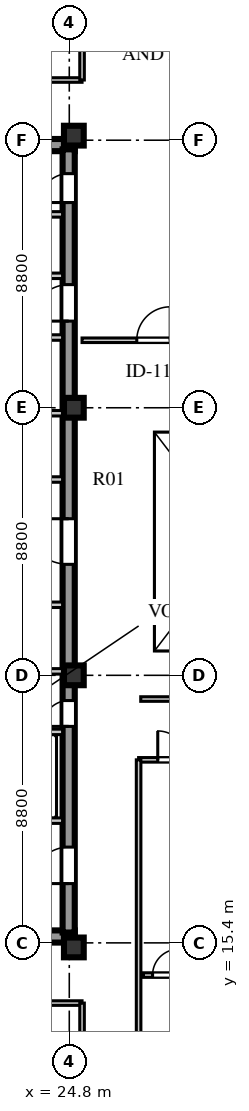
"""IFC4 building model, lengths in metres.
Left out: names, types, materials, properties, quantities, classifications, styles, units other than length and angle.
Written with IfcOpenShell. Run it as: python <this file> out.ifc"""

import sys

from ifc_helpers import new_model, si_unit, direction, frame, frame_2d, origin, origin_2d, place, context, subcontext, project, spatial, rectangle, extrude, element, fill, save


model = new_model("IFC4")
c1 = context("Model", 3, precision=1e-05, world=origin(), true_north=direction((0.0, 1.0)))
c2 = subcontext(c1, "Body", "Model", "MODEL_VIEW")
j1 = project(units=[si_unit("LENGTHUNIT", "METRE"), si_unit("PLANEANGLEUNIT", "RADIAN")], contexts=[c1])
p1 = place(None, origin())
s1 = spatial("IfcSite", under=j1, at=p1, CompositionType="ELEMENT")
p2 = place(p1, origin())
s2 = spatial("IfcBuilding", under=s1, at=p2, CompositionType="ELEMENT")
p3 = place(p2, frame((0.0, 0.0, 237.5)))
s3 = spatial("IfcBuildingStorey", under=s2, at=p3, CompositionType="ELEMENT", Elevation=237.5)
for number, where, z_axis, x_axis in (
    (1, (15.5, 15.61, 0.0), (0.0, 0.0, 1.0), (1.0, 0.0, 0.0)),
    (2, (15.5, 41.64, 0.0), (0.0, 0.0, 1.0), (1.0, 0.0, 0.0)),
):
    element("IfcWall", number, at=place(p3, frame(where, z_axis=z_axis, x_axis=x_axis)), inside=s3, PredefinedType="SHEAR", context=c2, shape_type="SweptSolid", body=[
        extrude(rectangle(XDim=9.48, YDim=0.4, at=frame_2d((4.74, 0.0))), origin(), (0.0, 0.0, 1.0), 3.66),
    ])
p4 = place(p3, frame((24.78, 15.74, 0.0), z_axis=(0.0, 0.0, 1.0), x_axis=(0.0, 1.0, 0.0)))
e3 = element("IfcWall", 3, at=p4, inside=s3, PredefinedType="SHEAR", context=c2, shape_type="SweptSolid", body=[
    extrude(rectangle(XDim=25.76, YDim=0.4, at=frame_2d((12.88, 0.0))), origin(), (0.0, 0.0, 1.0), 3.66),
])
p5 = place(p4, frame((1.61, 0.0, 0.0)))
e4 = element("IfcOpeningElement", 4, at=p5, cuts=e3, PredefinedType="OPENING", context=c2, shape_type="SweptSolid", body=[
    extrude(rectangle(XDim=1.2, YDim=2.1, at=frame_2d((0.6, 1.05))), frame((0.0, 0.21, 0.0), z_axis=(0.0, -1.0, 0.0), x_axis=(1.0, 0.0, 0.0)), (0.0, 0.0, 1.0), 0.42),
])
p6 = place(p4, frame((6.78, 0.0, 0.0)))
e5 = element("IfcOpeningElement", 5, at=p6, cuts=e3, PredefinedType="OPENING", context=c2, shape_type="SweptSolid", body=[
    extrude(rectangle(XDim=0.85, YDim=2.06, at=frame_2d((0.425, 1.03))), frame((0.0, 0.21, 0.0), z_axis=(0.0, -1.0, 0.0), x_axis=(1.0, 0.0, 0.0)), (0.0, 0.0, 1.0), 0.42),
])
p7 = place(p4, frame((12.11, 0.0, 0.0)))
e6 = element("IfcOpeningElement", 6, at=p7, cuts=e3, PredefinedType="OPENING", context=c2, shape_type="SweptSolid", body=[
    extrude(rectangle(XDim=1.5, YDim=2.12, at=frame_2d((0.75, 1.06))), frame((0.0, 0.21, 0.0), z_axis=(0.0, -1.0, 0.0), x_axis=(1.0, 0.0, 0.0)), (0.0, 0.0, 1.0), 0.42),
])
p8 = place(p4, frame((20.11, 0.0, 0.0)))
e7 = element("IfcOpeningElement", 7, at=p8, cuts=e3, PredefinedType="OPENING", context=c2, shape_type="SweptSolid", body=[
    extrude(rectangle(XDim=1.2, YDim=2.12, at=frame_2d((0.6, 1.06))), frame((0.0, 0.21, 0.0), z_axis=(0.0, -1.0, 0.0), x_axis=(1.0, 0.0, 0.0)), (0.0, 0.0, 1.0), 0.42),
])
p9 = place(p4, frame((24.01, 0.0, 0.0)))
e8 = element("IfcOpeningElement", 8, at=p9, cuts=e3, PredefinedType="OPENING", context=c2, shape_type="SweptSolid", body=[
    extrude(rectangle(XDim=0.95, YDim=2.1, at=frame_2d((0.475, 1.05))), frame((0.0, 0.21, 0.0), z_axis=(0.0, -1.0, 0.0), x_axis=(1.0, 0.0, 0.0)), (0.0, 0.0, 1.0), 0.42),
])
for number, where, z_axis, x_axis in (
    (9, (24.95, 15.25, 0.0), (0.0, 0.0, 1.0), (1.0, 0.0, 0.0)),
    (10, (24.95, 24.2, 0.0), (0.0, 0.0, 1.0), (1.0, 0.0, 0.0)),
    (11, (24.95, 33.0, 0.0), (0.0, 0.0, 1.0), (1.0, 0.0, 0.0)),
    (12, (24.95, 41.95, 0.0), (0.0, 0.0, 1.0), (1.0, 0.0, 0.0)),
):
    element("IfcColumn", number, at=place(p3, frame(where, z_axis=z_axis, x_axis=x_axis)), inside=s3, PredefinedType="COLUMN", context=c2, shape_type="SweptSolid", body=[
        extrude(rectangle(XDim=0.65, YDim=0.65, at=origin_2d()), origin(), (0.0, 0.0, 1.0), 3.66),
    ])
p10 = place(p3, frame((19.64, 19.42, 0.0), z_axis=(0.0, 0.0, 1.0), x_axis=(1.0, 0.0, 0.0)))
e13 = element("IfcWall", 13, at=p10, inside=s3, PredefinedType="SOLIDWALL", context=c2, shape_type="SweptSolid", body=[
    extrude(rectangle(XDim=4.94, YDim=0.18, at=frame_2d((2.47, 0.0))), origin(), (0.0, 0.0, 1.0), 3.66),
])
p11 = place(p10, frame((0.72, 0.0, 0.0)))
e14 = element("IfcOpeningElement", 14, at=p11, cuts=e13, PredefinedType="OPENING", context=c2, shape_type="SweptSolid", body=[
    extrude(rectangle(XDim=1.1, YDim=2.1, at=frame_2d((0.55, 1.05))), frame((0.0, 0.1, 0.0), z_axis=(0.0, -1.0, 0.0), x_axis=(1.0, 0.0, 0.0)), (0.0, 0.0, 1.0), 0.2),
])
p12 = place(p10, frame((3.02, 0.0, 0.0)))
e15 = element("IfcOpeningElement", 15, at=p12, cuts=e13, PredefinedType="OPENING", context=c2, shape_type="SweptSolid", body=[
    extrude(rectangle(XDim=1.1, YDim=2.1, at=frame_2d((0.55, 1.05))), frame((0.0, 0.1, 0.0), z_axis=(0.0, -1.0, 0.0), x_axis=(1.0, 0.0, 0.0)), (0.0, 0.0, 1.0), 0.2),
])
p13 = place(p3, frame((19.64, 22.34, 0.0), z_axis=(0.0, 0.0, 1.0), x_axis=(1.0, 0.0, 0.0)))
e16 = element("IfcWall", 16, at=p13, inside=s3, PredefinedType="SOLIDWALL", context=c2, shape_type="SweptSolid", body=[
    extrude(rectangle(XDim=4.94, YDim=0.18, at=frame_2d((2.47, 0.0))), origin(), (0.0, 0.0, 1.0), 3.66),
])
p14 = place(p3, frame((15.9, 26.52, 0.0), z_axis=(0.0, 0.0, 1.0), x_axis=(1.0, 0.0, 0.0)))
e17 = element("IfcWall", 17, at=p14, inside=s3, PredefinedType="SOLIDWALL", context=c2, shape_type="SweptSolid", body=[
    extrude(rectangle(XDim=8.68, YDim=0.18, at=frame_2d((4.34, 0.0))), origin(), (0.0, 0.0, 1.0), 3.66),
])
p15 = place(p14, frame((2.5, 0.0, 0.0)))
e18 = element("IfcOpeningElement", 18, at=p15, cuts=e17, PredefinedType="OPENING", context=c2, shape_type="SweptSolid", body=[
    extrude(rectangle(XDim=0.95, YDim=2.1, at=frame_2d((0.475, 1.05))), frame((0.0, 0.1, 0.0), z_axis=(0.0, -1.0, 0.0), x_axis=(1.0, 0.0, 0.0)), (0.0, 0.0, 1.0), 0.2),
])
p16 = place(p14, frame((6.0, 0.0, 0.0)))
e19 = element("IfcOpeningElement", 19, at=p16, cuts=e17, PredefinedType="OPENING", context=c2, shape_type="SweptSolid", body=[
    extrude(rectangle(XDim=0.95, YDim=2.1, at=frame_2d((0.475, 1.05))), frame((0.0, 0.1, 0.0), z_axis=(0.0, -1.0, 0.0), x_axis=(1.0, 0.0, 0.0)), (0.0, 0.0, 1.0), 0.2),
])
p17 = place(p3, frame((15.9, 24.33, 0.0), z_axis=(0.0, 0.0, 1.0), x_axis=(1.0, 0.0, 0.0)))
e20 = element("IfcWall", 20, at=p17, inside=s3, PredefinedType="SOLIDWALL", context=c2, shape_type="SweptSolid", body=[
    extrude(rectangle(XDim=8.68, YDim=0.18, at=frame_2d((4.34, 0.0))), origin(), (0.0, 0.0, 1.0), 3.06),
])
p18 = place(p3, frame((15.9, 30.64, 0.0), z_axis=(0.0, 0.0, 1.0), x_axis=(1.0, 0.0, 0.0)))
e21 = element("IfcWall", 21, at=p18, inside=s3, PredefinedType="SOLIDWALL", context=c2, shape_type="SweptSolid", body=[
    extrude(rectangle(XDim=8.68, YDim=0.18, at=frame_2d((4.34, 0.0))), origin(), (0.0, 0.0, 1.0), 3.66),
])
p19 = place(p18, frame((3.7, 0.0, 0.0)))
e22 = element("IfcOpeningElement", 22, at=p19, cuts=e21, PredefinedType="OPENING", context=c2, shape_type="SweptSolid", body=[
    extrude(rectangle(XDim=0.95, YDim=2.1, at=frame_2d((0.475, 1.05))), frame((0.0, 0.1, 0.0), z_axis=(0.0, -1.0, 0.0), x_axis=(1.0, 0.0, 0.0)), (0.0, 0.0, 1.0), 0.2),
])
p20 = place(p3, frame((15.9, 32.82, 0.0), z_axis=(0.0, 0.0, 1.0), x_axis=(1.0, 0.0, 0.0)))
e23 = element("IfcWall", 23, at=p20, inside=s3, PredefinedType="SOLIDWALL", context=c2, shape_type="SweptSolid", body=[
    extrude(rectangle(XDim=8.68, YDim=0.18, at=frame_2d((4.34, 0.0))), origin(), (0.0, 0.0, 1.0), 3.06),
])
p21 = place(p3, frame((22.02, 35.31, 0.0), z_axis=(0.0, 0.0, 1.0), x_axis=(1.0, 0.0, 0.0)))
e24 = element("IfcWall", 24, at=p21, inside=s3, PredefinedType="SOLIDWALL", context=c2, shape_type="SweptSolid", body=[
    extrude(rectangle(XDim=2.56, YDim=0.18, at=frame_2d((1.28, 0.0))), origin(), (0.0, 0.0, 1.0), 3.66),
])
p22 = place(p21, frame((0.55, 0.0, 0.0)))
e25 = element("IfcOpeningElement", 25, at=p22, cuts=e24, PredefinedType="OPENING", context=c2, shape_type="SweptSolid", body=[
    extrude(rectangle(XDim=1.0, YDim=2.1, at=frame_2d((0.5, 1.05))), frame((0.0, 0.1, 0.0), z_axis=(0.0, -1.0, 0.0), x_axis=(1.0, 0.0, 0.0)), (0.0, 0.0, 1.0), 0.2),
])
p23 = place(p3, frame((19.64, 37.34, 0.0), z_axis=(0.0, 0.0, 1.0), x_axis=(1.0, 0.0, 0.0)))
e26 = element("IfcWall", 26, at=p23, inside=s3, PredefinedType="SOLIDWALL", context=c2, shape_type="SweptSolid", body=[
    extrude(rectangle(XDim=4.94, YDim=0.18, at=frame_2d((2.47, 0.0))), origin(), (0.0, 0.0, 1.0), 3.66),
])
p24 = place(p23, frame((0.45, 0.0, 0.0)))
e27 = element("IfcOpeningElement", 27, at=p24, cuts=e26, PredefinedType="OPENING", context=c2, shape_type="SweptSolid", body=[
    extrude(rectangle(XDim=1.0, YDim=2.1, at=frame_2d((0.5, 1.05))), frame((0.0, 0.1, 0.0), z_axis=(0.0, -1.0, 0.0), x_axis=(1.0, 0.0, 0.0)), (0.0, 0.0, 1.0), 0.2),
])
p25 = place(p23, frame((2.5, 0.0, 0.0)))
e28 = element("IfcOpeningElement", 28, at=p25, cuts=e26, PredefinedType="OPENING", context=c2, shape_type="SweptSolid", body=[
    extrude(rectangle(XDim=1.0, YDim=2.1, at=frame_2d((0.5, 1.05))), frame((0.0, 0.1, 0.0), z_axis=(0.0, -1.0, 0.0), x_axis=(1.0, 0.0, 0.0)), (0.0, 0.0, 1.0), 0.2),
])
p26 = place(p3, frame((19.64, 39.36, 0.0), z_axis=(0.0, 0.0, 1.0), x_axis=(1.0, 0.0, 0.0)))
e29 = element("IfcWall", 29, at=p26, inside=s3, PredefinedType="SOLIDWALL", context=c2, shape_type="SweptSolid", body=[
    extrude(rectangle(XDim=4.94, YDim=0.18, at=frame_2d((2.47, 0.0))), origin(), (0.0, 0.0, 1.0), 3.66),
])
p27 = place(p3, frame((27.08, 21.42, 0.0), z_axis=(0.0, 0.0, 1.0), x_axis=(1.0, 0.0, 0.0)))
e30 = element("IfcWall", 30, at=p27, inside=s3, PredefinedType="PARTITIONING", context=c2, shape_type="SweptSolid", body=[
    extrude(rectangle(XDim=12.07, YDim=0.15, at=frame_2d((6.035, 0.0))), origin(), (0.0, 0.0, 1.0), 3.31),
])
p28 = place(p27, frame((0.63, 0.0, 0.0)))
e31 = element("IfcOpeningElement", 31, at=p28, cuts=e30, PredefinedType="OPENING", context=c2, shape_type="SweptSolid", body=[
    extrude(rectangle(XDim=0.95, YDim=2.1, at=frame_2d((0.475, 1.05))), frame((0.0, 0.085, 0.0), z_axis=(0.0, -1.0, 0.0), x_axis=(1.0, 0.0, 0.0)), (0.0, 0.0, 1.0), 0.17),
])
p29 = place(p3, frame((27.08, 7.88, 0.0), z_axis=(0.0, 0.0, 1.0), x_axis=(0.0, 1.0, 0.0)))
e32 = element("IfcWall", 32, at=p29, inside=s3, PredefinedType="PARTITIONING", context=c2, shape_type="SweptSolid", body=[
    extrude(rectangle(XDim=13.54, YDim=0.15, at=frame_2d((6.77, 0.0))), origin(), (0.0, 0.0, 1.0), 3.66),
])
p30 = place(p3, frame((27.15, 23.42, 0.0), z_axis=(0.0, 0.0, 1.0), x_axis=(1.0, 0.0, 0.0)))
e33 = element("IfcWall", 33, at=p30, inside=s3, PredefinedType="PARTITIONING", context=c2, shape_type="SweptSolid", body=[
    extrude(rectangle(XDim=6.0, YDim=0.15, at=frame_2d((3.0, 0.0))), origin(), (0.0, 0.0, 1.0), 3.66),
])
p31 = place(p3, frame((25.22, 35.22, 0.0), z_axis=(0.0, 0.0, 1.0), x_axis=(1.0, 0.0, 0.0)))
e34 = element("IfcWall", 34, at=p31, inside=s3, PredefinedType="PARTITIONING", context=c2, shape_type="SweptSolid", body=[
    extrude(rectangle(XDim=9.5, YDim=0.15, at=frame_2d((4.75, 0.0))), origin(), (0.0, 0.0, 1.0), 3.66),
])
p32 = place(p31, frame((1.8, 0.0, 0.0)))
e35 = element("IfcOpeningElement", 35, at=p32, cuts=e34, PredefinedType="OPENING", context=c2, shape_type="SweptSolid", body=[
    extrude(rectangle(XDim=1.1, YDim=2.08, at=frame_2d((0.55, 1.04))), frame((0.0, 0.085, 0.0), z_axis=(0.0, -1.0, 0.0), x_axis=(1.0, 0.0, 0.0)), (0.0, 0.0, 1.0), 0.17),
])
p33 = place(p3, frame((13.4, 13.42, 0.0), z_axis=(0.0, 0.0, 1.0), x_axis=(1.0, 0.0, 0.0)))
e36 = element("IfcWall", 36, at=p33, inside=s3, PredefinedType="PARTITIONING", context=c2, shape_type="SweptSolid", body=[
    extrude(rectangle(XDim=11.82, YDim=0.15, at=frame_2d((5.91, 0.0))), origin(), (0.0, 0.0, 1.0), 3.66),
])
p34 = place(p33, frame((3.2, 0.0, 0.0)))
e37 = element("IfcOpeningElement", 37, at=p34, cuts=e36, PredefinedType="OPENING", context=c2, shape_type="SweptSolid", body=[
    extrude(rectangle(XDim=0.95, YDim=2.08, at=frame_2d((0.475, 1.04))), frame((0.0, 0.085, 0.0), z_axis=(0.0, -1.0, 0.0), x_axis=(1.0, 0.0, 0.0)), (0.0, 0.0, 1.0), 0.17),
])
p35 = place(p3, frame((25.22, 7.88, 0.0), z_axis=(0.0, 0.0, 1.0), x_axis=(0.0, 1.0, 0.0)))
e38 = element("IfcWall", 38, at=p35, inside=s3, PredefinedType="PARTITIONING", context=c2, shape_type="SweptSolid", body=[
    extrude(rectangle(XDim=5.54, YDim=0.15, at=frame_2d((2.77, 0.0))), origin(), (0.0, 0.0, 1.0), 3.21),
])
p36 = place(p3, frame((13.4, 43.78, 0.0), z_axis=(0.0, 0.0, 1.0), x_axis=(1.0, 0.0, 0.0)))
e39 = element("IfcWall", 39, at=p36, inside=s3, PredefinedType="PARTITIONING", context=c2, shape_type="SweptSolid", body=[
    extrude(rectangle(XDim=11.82, YDim=0.15, at=frame_2d((5.91, 0.0))), origin(), (0.0, 0.0, 1.0), 3.66),
])
p37 = place(p36, frame((3.2, 0.0, 0.0)))
e40 = element("IfcOpeningElement", 40, at=p37, cuts=e39, PredefinedType="OPENING", context=c2, shape_type="SweptSolid", body=[
    extrude(rectangle(XDim=0.95, YDim=2.08, at=frame_2d((0.475, 1.04))), frame((0.0, 0.085, 0.0), z_axis=(0.0, -1.0, 0.0), x_axis=(1.0, 0.0, 0.0)), (0.0, 0.0, 1.0), 0.17),
])
p38 = place(p3, frame((25.22, 43.78, 0.0), z_axis=(0.0, 0.0, 1.0), x_axis=(0.0, 1.0, 0.0)))
e41 = element("IfcWall", 41, at=p38, inside=s3, PredefinedType="PARTITIONING", context=c2, shape_type="SweptSolid", body=[
    extrude(rectangle(XDim=5.54, YDim=0.15, at=frame_2d((2.77, 0.0))), origin(), (0.0, 0.0, 1.0), 3.21),
])
p39 = place(p3, frame((27.24, 14.341, 0.0), z_axis=(0.0, 0.0, 1.0), x_axis=(1.0, 0.0, 0.0)))
e42 = element("IfcWall", 42, at=p39, inside=s3, PredefinedType="PARTITIONING", context=c2, shape_type="SweptSolid", body=[
    extrude(rectangle(XDim=11.83, YDim=0.15, at=frame_2d((5.915, 0.0))), origin(), (0.0, 0.0, 1.0), 3.66),
])
p40 = place(p39, frame((0.3, 0.0, 0.0)))
e43 = element("IfcOpeningElement", 43, at=p40, cuts=e42, PredefinedType="OPENING", context=c2, shape_type="SweptSolid", body=[
    extrude(rectangle(XDim=0.85, YDim=2.08, at=frame_2d((0.425, 1.04))), frame((0.0, 0.085, 0.0), z_axis=(0.0, -1.0, 0.0), x_axis=(1.0, 0.0, 0.0)), (0.0, 0.0, 1.0), 0.17),
])
p41 = place(p39, frame((3.135, 0.0, 0.0)))
e44 = element("IfcOpeningElement", 44, at=p41, cuts=e42, PredefinedType="OPENING", context=c2, shape_type="SweptSolid", body=[
    extrude(rectangle(XDim=0.85, YDim=2.08, at=frame_2d((0.425, 1.04))), frame((0.0, 0.085, 0.0), z_axis=(0.0, -1.0, 0.0), x_axis=(1.0, 0.0, 0.0)), (0.0, 0.0, 1.0), 0.17),
])
p42 = place(p5, frame((1.2, 0.0, 0.0), z_axis=(0.0, 0.0, 1.0), x_axis=(-1.0, 0.0, 0.0)))
e45 = element("IfcDoor", 45, at=p42, inside=s3, OperationType="SINGLE_SWING_RIGHT", PredefinedType="DOOR", context=c2, shape_type="SweptSolid", body=[
    extrude(rectangle(XDim=1.2, YDim=2.1, at=frame_2d((0.6, 1.05))), frame((0.0, 0.025, 0.0), z_axis=(0.0, -1.0, 0.0), x_axis=(1.0, 0.0, 0.0)), (0.0, 0.0, 1.0), 0.05),
])
fill(e4, e45)
p43 = place(p6, frame((0.85, 0.0, 0.0), z_axis=(0.0, 0.0, 1.0), x_axis=(-1.0, 0.0, 0.0)))
e46 = element("IfcDoor", 46, at=p43, inside=s3, OperationType="SINGLE_SWING_RIGHT", PredefinedType="DOOR", context=c2, shape_type="SweptSolid", body=[
    extrude(rectangle(XDim=0.85, YDim=2.06, at=frame_2d((0.425, 1.03))), frame((0.0, 0.025, 0.0), z_axis=(0.0, -1.0, 0.0), x_axis=(1.0, 0.0, 0.0)), (0.0, 0.0, 1.0), 0.05),
])
fill(e5, e46)
p44 = place(p7, frame((1.5, 0.0, 0.0), z_axis=(0.0, 0.0, 1.0), x_axis=(-1.0, 0.0, 0.0)))
e47 = element("IfcDoor", 47, at=p44, inside=s3, OperationType="SINGLE_SWING_LEFT", PredefinedType="DOOR", context=c2, shape_type="SweptSolid", body=[
    extrude(rectangle(XDim=1.5, YDim=2.12, at=frame_2d((0.75, 1.06))), frame((0.0, 0.025, 0.0), z_axis=(0.0, -1.0, 0.0), x_axis=(1.0, 0.0, 0.0)), (0.0, 0.0, 1.0), 0.05),
])
fill(e6, e47)
p45 = place(p8, frame((1.2, 0.0, 0.0), z_axis=(0.0, 0.0, 1.0), x_axis=(-1.0, 0.0, 0.0)))
e48 = element("IfcDoor", 48, at=p45, inside=s3, OperationType="SINGLE_SWING_RIGHT", PredefinedType="DOOR", context=c2, shape_type="SweptSolid", body=[
    extrude(rectangle(XDim=1.2, YDim=2.12, at=frame_2d((0.6, 1.06))), frame((0.0, 0.025, 0.0), z_axis=(0.0, -1.0, 0.0), x_axis=(1.0, 0.0, 0.0)), (0.0, 0.0, 1.0), 0.05),
])
fill(e7, e48)
p46 = place(p9, frame((0.95, 0.0, 0.0), z_axis=(0.0, 0.0, 1.0), x_axis=(-1.0, 0.0, 0.0)))
e49 = element("IfcDoor", 49, at=p46, inside=s3, OperationType="SINGLE_SWING_RIGHT", PredefinedType="DOOR", context=c2, shape_type="SweptSolid", body=[
    extrude(rectangle(XDim=0.95, YDim=2.1, at=frame_2d((0.475, 1.05))), frame((0.0, 0.025, 0.0), z_axis=(0.0, -1.0, 0.0), x_axis=(1.0, 0.0, 0.0)), (0.0, 0.0, 1.0), 0.05),
])
fill(e8, e49)
p47 = place(p40, frame((0.85, 0.0, 0.0), z_axis=(0.0, 0.0, 1.0), x_axis=(-1.0, 0.0, 0.0)))
e50 = element("IfcDoor", 50, at=p47, inside=s3, OperationType="SINGLE_SWING_LEFT", PredefinedType="DOOR", context=c2, shape_type="SweptSolid", body=[
    extrude(rectangle(XDim=0.85, YDim=2.08, at=frame_2d((0.425, 1.04))), frame((0.0, 0.025, 0.0), z_axis=(0.0, -1.0, 0.0), x_axis=(1.0, 0.0, 0.0)), (0.0, 0.0, 1.0), 0.05),
])
fill(e43, e50)
p48 = place(p28, frame((0.95, 0.0, 0.0), z_axis=(0.0, 0.0, 1.0), x_axis=(-1.0, 0.0, 0.0)))
e51 = element("IfcDoor", 51, at=p48, inside=s3, OperationType="SINGLE_SWING_RIGHT", PredefinedType="DOOR", context=c2, shape_type="SweptSolid", body=[
    extrude(rectangle(XDim=0.95, YDim=2.1, at=frame_2d((0.475, 1.05))), frame((0.0, 0.025, 0.0), z_axis=(0.0, -1.0, 0.0), x_axis=(1.0, 0.0, 0.0)), (0.0, 0.0, 1.0), 0.05),
])
fill(e31, e51)
p49 = place(p32, origin())
e52 = element("IfcDoor", 52, at=p49, inside=s3, OperationType="SINGLE_SWING_RIGHT", PredefinedType="DOOR", context=c2, shape_type="SweptSolid", body=[
    extrude(rectangle(XDim=1.1, YDim=2.08, at=frame_2d((0.55, 1.04))), frame((0.0, 0.025, 0.0), z_axis=(0.0, -1.0, 0.0), x_axis=(1.0, 0.0, 0.0)), (0.0, 0.0, 1.0), 0.05),
])
fill(e35, e52)
save(model, sys.argv[1])
